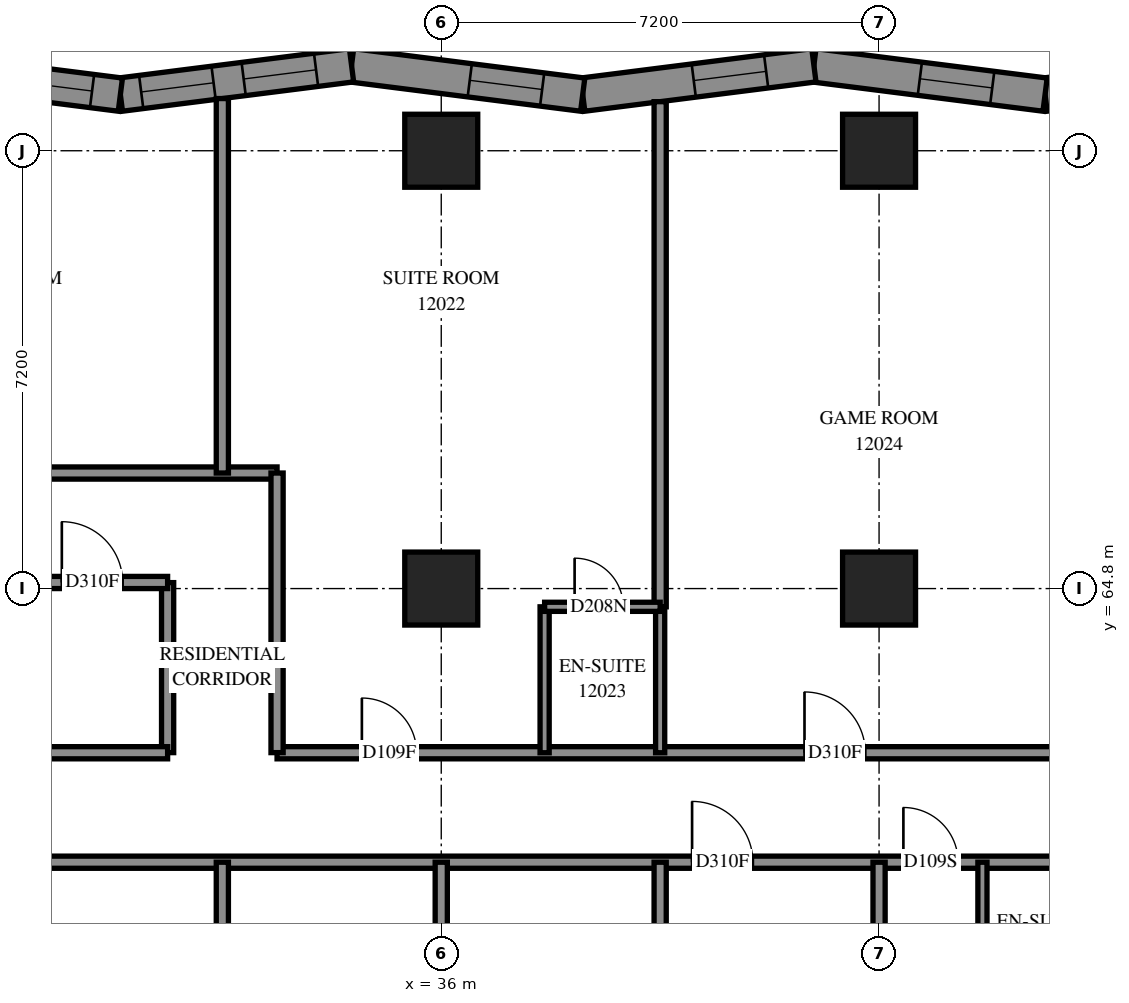
"""IFC4 building model, lengths in metres.
Left out: names, types, materials, properties, quantities, classifications, styles, units other than length and angle.
Written with IfcOpenShell. Run it as: python <this file> out.ifc"""

import sys

from ifc_helpers import new_model, si_unit, direction, frame, frame_2d, origin, origin_2d, place, context, subcontext, project, spatial, polyline, rectangle, outline, extrude, element, fill, save


model = new_model("IFC4")
c1 = context("Model", 3, precision=1e-05, world=origin(), true_north=direction((0.0, 1.0)))
c2 = subcontext(c1, "Body", "Model", "MODEL_VIEW")
j1 = project(units=[si_unit("LENGTHUNIT", "METRE"), si_unit("PLANEANGLEUNIT", "RADIAN")], contexts=[c1])
p1 = place(None, origin())
s1 = spatial("IfcSite", under=j1, at=p1, CompositionType="ELEMENT")
p2 = place(p1, origin())
s2 = spatial("IfcBuilding", under=s1, at=p2, CompositionType="ELEMENT")
p3 = place(p2, frame((0.0, 0.0, 47.4)))
s3 = spatial("IfcBuildingStorey", under=s2, at=p3, CompositionType="ELEMENT", Elevation=47.4)
for number, where, z_axis, x_axis in (
    (1, (36.0, 64.8, 0.0), (0.0, 0.0, 1.0), (1.0, 0.0, 0.0)),
    (2, (36.0, 72.0, 0.0), (0.0, 0.0, 1.0), (1.0, 0.0, 0.0)),
    (3, (43.2, 64.8, 0.0), (0.0, 0.0, 1.0), (1.0, 0.0, 0.0)),
    (4, (43.2, 72.0, 0.0), (0.0, 0.0, 1.0), (1.0, 0.0, 0.0)),
):
    element("IfcColumn", number, at=place(p3, frame(where, z_axis=z_axis, x_axis=x_axis)), inside=s3, PredefinedType="COLUMN", context=c2, shape_type="SweptSolid", body=[
        extrude(rectangle(XDim=1.2, YDim=1.2, at=origin_2d()), origin(), (0.0, 0.0, 1.0), 3.1),
    ])
p4 = place(p3, frame((49.732, 73.405, 0.0), z_axis=(0.0, 0.0, 1.0), x_axis=(-0.9920583495, -0.1257785003, 0.0)))
e5 = element("IfcWall", 5, at=p4, inside=s3, PredefinedType="SOLIDWALL", context=c2, shape_type="SweptSolid", body=[
    extrude(outline(polyline([(-0.035, -0.275), (3.797, -0.275), (3.867, 0.275), (0.035, 0.275), (-0.035, -0.275)])), origin(), (0.0, 0.0, 1.0), 3.1),
])
p5 = place(p4, frame((0.995, 0.0, 0.5)))
e6 = element("IfcOpeningElement", 6, at=p5, cuts=e5, PredefinedType="OPENING", context=c2, shape_type="SweptSolid", body=[
    extrude(rectangle(XDim=1.2, YDim=2.45, at=frame_2d((0.6, 1.225))), frame((0.0, 0.285, 0.0), z_axis=(0.0, -1.0, 0.0), x_axis=(1.0, 0.0, 0.0)), (0.0, 0.0, 1.0), 0.57),
])
p6 = place(p3, frame((45.93, 72.923, 0.0), z_axis=(0.0, 0.0, 1.0), x_axis=(-0.9920583495, 0.1257785003, 0.0)))
e7 = element("IfcWall", 7, at=p6, inside=s3, PredefinedType="SOLIDWALL", context=c2, shape_type="SweptSolid", body=[
    extrude(outline(polyline([(0.035, -0.275), (3.867, -0.275), (3.797, 0.275), (-0.035, 0.275), (0.035, -0.275)])), origin(), (0.0, 0.0, 1.0), 3.1),
])
p7 = place(p6, frame((0.876, 0.0, 0.5)))
e8 = element("IfcOpeningElement", 8, at=p7, cuts=e7, PredefinedType="OPENING", context=c2, shape_type="SweptSolid", body=[
    extrude(rectangle(XDim=1.2, YDim=2.45, at=frame_2d((0.6, 1.225))), frame((0.0, 0.285, 0.0), z_axis=(0.0, -1.0, 0.0), x_axis=(1.0, 0.0, 0.0)), (0.0, 0.0, 1.0), 0.57),
])
p8 = place(p3, frame((42.128, 73.405, 0.0), z_axis=(0.0, 0.0, 1.0), x_axis=(-0.9920583495, -0.1257785003, 0.0)))
e9 = element("IfcWall", 9, at=p8, inside=s3, PredefinedType="SOLIDWALL", context=c2, shape_type="SweptSolid", body=[
    extrude(outline(polyline([(-0.035, -0.275), (3.797, -0.275), (3.867, 0.275), (0.035, 0.275), (-0.035, -0.275)])), origin(), (0.0, 0.0, 1.0), 3.1),
])
p9 = place(p8, frame((0.792, 0.0, 0.5)))
e10 = element("IfcOpeningElement", 10, at=p9, cuts=e9, PredefinedType="OPENING", context=c2, shape_type="SweptSolid", body=[
    extrude(rectangle(XDim=1.2, YDim=2.45, at=frame_2d((0.6, 1.225))), frame((0.0, 0.285, 0.0), z_axis=(0.0, -1.0, 0.0), x_axis=(1.0, 0.0, 0.0)), (0.0, 0.0, 1.0), 0.57),
])
p10 = place(p3, frame((38.327, 72.923, 0.0), z_axis=(0.0, 0.0, 1.0), x_axis=(-0.9920583495, 0.1257785003, 0.0)))
e11 = element("IfcWall", 11, at=p10, inside=s3, PredefinedType="SOLIDWALL", context=c2, shape_type="SweptSolid", body=[
    extrude(outline(polyline([(0.035, -0.275), (3.867, -0.275), (3.797, 0.275), (-0.035, 0.275), (0.035, -0.275)])), origin(), (0.0, 0.0, 1.0), 3.1),
])
p11 = place(p10, frame((0.673, 0.0, 0.5)))
e12 = element("IfcOpeningElement", 12, at=p11, cuts=e11, PredefinedType="OPENING", context=c2, shape_type="SweptSolid", body=[
    extrude(rectangle(XDim=1.2, YDim=2.45, at=frame_2d((0.6, 1.225))), frame((0.0, 0.285, 0.0), z_axis=(0.0, -1.0, 0.0), x_axis=(1.0, 0.0, 0.0)), (0.0, 0.0, 1.0), 0.57),
])
p12 = place(p3, frame((34.525, 73.405, 0.0), z_axis=(0.0, 0.0, 1.0), x_axis=(-0.9920583495, -0.1257785003, 0.0)))
e13 = element("IfcWall", 13, at=p12, inside=s3, PredefinedType="SOLIDWALL", context=c2, shape_type="SweptSolid", body=[
    extrude(outline(polyline([(-0.035, -0.275), (3.797, -0.275), (3.867, 0.275), (0.035, 0.275), (-0.035, -0.275)])), origin(), (0.0, 0.0, 1.0), 3.1),
])
p13 = place(p12, frame((0.588, 0.0, 0.5)))
e14 = element("IfcOpeningElement", 14, at=p13, cuts=e13, PredefinedType="OPENING", context=c2, shape_type="SweptSolid", body=[
    extrude(rectangle(XDim=1.2, YDim=2.45, at=frame_2d((0.6, 1.225))), frame((0.0, 0.285, 0.0), z_axis=(0.0, -1.0, 0.0), x_axis=(1.0, 0.0, 0.0)), (0.0, 0.0, 1.0), 0.57),
])
p14 = place(p12, frame((2.287, 0.0, 0.5)))
e15 = element("IfcOpeningElement", 15, at=p14, cuts=e13, PredefinedType="OPENING", context=c2, shape_type="SweptSolid", body=[
    extrude(rectangle(XDim=1.2, YDim=2.45, at=frame_2d((0.6, 1.225))), frame((0.0, 0.285, 0.0), z_axis=(0.0, -1.0, 0.0), x_axis=(1.0, 0.0, 0.0)), (0.0, 0.0, 1.0), 0.57),
])
p15 = place(p3, frame((30.723, 72.923, 0.0), z_axis=(0.0, 0.0, 1.0), x_axis=(-0.9920583495, 0.1257785003, 0.0)))
e16 = element("IfcWall", 16, at=p15, inside=s3, PredefinedType="SOLIDWALL", context=c2, shape_type="SweptSolid", body=[
    extrude(outline(polyline([(0.035, -0.275), (3.867, -0.275), (3.797, 0.275), (-0.035, 0.275), (0.035, -0.275)])), origin(), (0.0, 0.0, 1.0), 3.1),
])
p16 = place(p15, frame((0.469, 0.0, 0.5)))
e17 = element("IfcOpeningElement", 17, at=p16, cuts=e16, PredefinedType="OPENING", context=c2, shape_type="SweptSolid", body=[
    extrude(rectangle(XDim=1.2, YDim=2.45, at=frame_2d((0.6, 1.225))), frame((0.0, 0.285, 0.0), z_axis=(0.0, -1.0, 0.0), x_axis=(1.0, 0.0, 0.0)), (0.0, 0.0, 1.0), 0.57),
])
p17 = place(p15, frame((2.168, 0.0, 0.5)))
e18 = element("IfcOpeningElement", 18, at=p17, cuts=e16, PredefinedType="OPENING", context=c2, shape_type="SweptSolid", body=[
    extrude(rectangle(XDim=1.2, YDim=2.45, at=frame_2d((0.6, 1.225))), frame((0.0, 0.285, 0.0), z_axis=(0.0, -1.0, 0.0), x_axis=(1.0, 0.0, 0.0)), (0.0, 0.0, 1.0), 0.57),
])
p18 = place(p3, frame((28.802, 60.3, 0.0), z_axis=(0.0, 0.0, 1.0), x_axis=(1.0, 0.0, 0.0)))
e19 = element("IfcWall", 19, at=p18, inside=s3, PredefinedType="PARTITIONING", context=c2, shape_type="SweptSolid", body=[
    extrude(rectangle(XDim=24.108, YDim=0.2, at=frame_2d((12.054, 0.0))), origin(), (0.0, 0.0, 1.0), 3.1),
])
p19 = place(p18, frame((11.323, 0.0, 0.0)))
e20 = element("IfcOpeningElement", 20, at=p19, cuts=e19, PredefinedType="OPENING", context=c2, shape_type="SweptSolid", body=[
    extrude(rectangle(XDim=1.0, YDim=2.1, at=frame_2d((0.5, 1.05))), frame((0.0, 0.11, 0.0), z_axis=(0.0, -1.0, 0.0), x_axis=(1.0, 0.0, 0.0)), (0.0, 0.0, 1.0), 0.22),
])
p20 = place(p18, frame((14.798, 0.0, 0.0)))
e21 = element("IfcOpeningElement", 21, at=p20, cuts=e19, PredefinedType="OPENING", context=c2, shape_type="SweptSolid", body=[
    extrude(rectangle(XDim=0.9, YDim=2.1, at=frame_2d((0.45, 1.05))), frame((0.0, 0.11, 0.0), z_axis=(0.0, -1.0, 0.0), x_axis=(1.0, 0.0, 0.0)), (0.0, 0.0, 1.0), 0.22),
])
p21 = place(p18, frame((18.833, 0.0, 0.0)))
e22 = element("IfcOpeningElement", 22, at=p21, cuts=e19, PredefinedType="OPENING", context=c2, shape_type="SweptSolid", body=[
    extrude(rectangle(XDim=1.0, YDim=2.1, at=frame_2d((0.5, 1.05))), frame((0.0, 0.11, 0.0), z_axis=(0.0, -1.0, 0.0), x_axis=(1.0, 0.0, 0.0)), (0.0, 0.0, 1.0), 0.22),
])
p22 = place(p18, frame((22.839, 0.0, 0.0)))
e23 = element("IfcOpeningElement", 23, at=p22, cuts=e19, PredefinedType="OPENING", context=c2, shape_type="SweptSolid", body=[
    extrude(rectangle(XDim=1.0, YDim=2.1, at=frame_2d((0.5, 1.05))), frame((0.0, 0.11, 0.0), z_axis=(0.0, -1.0, 0.0), x_axis=(1.0, 0.0, 0.0)), (0.0, 0.0, 1.0), 0.22),
])
p23 = place(p3, frame((33.3, 62.1, 0.0), z_axis=(0.0, 0.0, 1.0), x_axis=(1.0, 0.0, 0.0)))
e24 = element("IfcWall", 24, at=p23, inside=s3, PredefinedType="PARTITIONING", context=c2, shape_type="SweptSolid", body=[
    extrude(rectangle(XDim=21.2, YDim=0.2, at=frame_2d((10.6, 0.0))), origin(), (0.0, 0.0, 1.0), 3.1),
])
p24 = place(p23, frame((1.395, 0.0, 0.0)))
e25 = element("IfcOpeningElement", 25, at=p24, cuts=e24, PredefinedType="OPENING", context=c2, shape_type="SweptSolid", body=[
    extrude(rectangle(XDim=0.9, YDim=2.1, at=frame_2d((0.45, 1.05))), frame((0.0, 0.11, 0.0), z_axis=(0.0, -1.0, 0.0), x_axis=(1.0, 0.0, 0.0)), (0.0, 0.0, 1.0), 0.22),
])
p25 = place(p23, frame((8.674, 0.0, 0.0)))
e26 = element("IfcOpeningElement", 26, at=p25, cuts=e24, PredefinedType="OPENING", context=c2, shape_type="SweptSolid", body=[
    extrude(rectangle(XDim=1.0, YDim=2.1, at=frame_2d((0.5, 1.05))), frame((0.0, 0.11, 0.0), z_axis=(0.0, -1.0, 0.0), x_axis=(1.0, 0.0, 0.0)), (0.0, 0.0, 1.0), 0.22),
])
p26 = place(p23, frame((15.874, 0.0, 0.0)))
e27 = element("IfcOpeningElement", 27, at=p26, cuts=e24, PredefinedType="OPENING", context=c2, shape_type="SweptSolid", body=[
    extrude(rectangle(XDim=1.0, YDim=2.1, at=frame_2d((0.5, 1.05))), frame((0.0, 0.11, 0.0), z_axis=(0.0, -1.0, 0.0), x_axis=(1.0, 0.0, 0.0)), (0.0, 0.0, 1.0), 0.22),
])
p27 = place(p3, frame((21.602, 66.7, 0.0), z_axis=(0.0, 0.0, 1.0), x_axis=(1.0, 0.0, 0.0)))
e28 = element("IfcWall", 28, at=p27, inside=s3, PredefinedType="PARTITIONING", context=c2, shape_type="SweptSolid", body=[
    extrude(rectangle(XDim=11.698, YDim=0.2, at=frame_2d((5.849, 0.0))), origin(), (0.0, 0.0, 1.0), 3.1),
])
p28 = place(p27, frame((1.79, 0.0, 0.0)))
e29 = element("IfcOpeningElement", 29, at=p28, cuts=e28, PredefinedType="OPENING", context=c2, shape_type="SweptSolid", body=[
    extrude(rectangle(XDim=1.0, YDim=2.1, at=frame_2d((0.5, 1.05))), frame((0.0, 0.11, 0.0), z_axis=(0.0, -1.0, 0.0), x_axis=(1.0, 0.0, 0.0)), (0.0, 0.0, 1.0), 0.22),
])
p29 = place(p27, frame((5.972, 0.0, 0.0)))
e30 = element("IfcOpeningElement", 30, at=p29, cuts=e28, PredefinedType="OPENING", context=c2, shape_type="SweptSolid", body=[
    extrude(rectangle(XDim=1.0, YDim=2.1, at=frame_2d((0.5, 1.05))), frame((0.0, 0.11, 0.0), z_axis=(0.0, -1.0, 0.0), x_axis=(1.0, 0.0, 0.0)), (0.0, 0.0, 1.0), 0.22),
])
p30 = place(p3, frame((39.6, 64.5, 0.0), z_axis=(0.0, 0.0, 1.0), x_axis=(0.0, 1.0, 0.0)))
e31 = element("IfcWall", 31, at=p30, inside=s3, PredefinedType="PARTITIONING", context=c2, shape_type="SweptSolid", body=[
    extrude(rectangle(XDim=8.307, YDim=0.2, at=frame_2d((4.154, 0.0))), origin(), (0.0, 0.0, 1.0), 3.1),
])
p31 = place(p3, frame((32.4, 66.7, 0.0), z_axis=(0.0, 0.0, 1.0), x_axis=(0.0, 1.0, 0.0)))
e32 = element("IfcWall", 32, at=p31, inside=s3, PredefinedType="PARTITIONING", context=c2, shape_type="SweptSolid", body=[
    extrude(rectangle(XDim=6.158, YDim=0.2, at=frame_2d((3.079, 0.0))), origin(), (0.0, 0.0, 1.0), 3.1),
])
p32 = place(p3, frame((33.3, 62.102, 0.0), z_axis=(0.0, 0.0, 1.0), x_axis=(0.0, 1.0, 0.0)))
e33 = element("IfcWall", 33, at=p32, inside=s3, PredefinedType="PARTITIONING", context=c2, shape_type="SweptSolid", body=[
    extrude(rectangle(XDim=4.598, YDim=0.2, at=frame_2d((2.299, 0.0))), origin(), (0.0, 0.0, 1.0), 3.1),
])
for number, where, z_axis, x_axis in (
    (34, (32.4, 55.868, 0.0), (0.0, 0.0, 1.0), (0.0, 1.0, 0.0)),
    (35, (39.6, 55.868, 0.0), (0.0, 0.0, 1.0), (0.0, 1.0, 0.0)),
):
    element("IfcWall", number, at=place(p3, frame(where, z_axis=z_axis, x_axis=x_axis)), inside=s3, PredefinedType="PARTITIONING", context=c2, shape_type="SweptSolid", body=[
        extrude(rectangle(XDim=4.432, YDim=0.2, at=frame_2d((2.216, 0.0))), origin(), (0.0, 0.0, 1.0), 3.1),
    ])
p33 = place(p3, frame((31.5, 62.102, 0.0), z_axis=(0.0, 0.0, 1.0), x_axis=(0.0, 1.0, 0.0)))
e36 = element("IfcWall", 36, at=p33, inside=s3, PredefinedType="PARTITIONING", context=c2, shape_type="SweptSolid", body=[
    extrude(rectangle(XDim=2.796, YDim=0.2, at=frame_2d((1.398, 0.0))), origin(), (0.0, 0.0, 1.0), 3.1),
])
p34 = place(p3, frame((28.802, 62.1, 0.0), z_axis=(0.0, 0.0, 1.0), x_axis=(1.0, 0.0, 0.0)))
e37 = element("IfcWall", 37, at=p34, inside=s3, PredefinedType="PARTITIONING", context=c2, shape_type="SweptSolid", body=[
    extrude(rectangle(XDim=2.698, YDim=0.2, at=frame_2d((1.349, 0.0))), origin(), (0.0, 0.0, 1.0), 3.1),
])
for number, where, z_axis, x_axis in (
    (38, (37.7, 62.1, 0.0), (0.0, 0.0, 1.0), (0.0, 1.0, 0.0)),
    (39, (39.6, 62.1, 0.0), (0.0, 0.0, 1.0), (0.0, 1.0, 0.0)),
    (40, (44.9, 57.9, 0.0), (0.0, 0.0, 1.0), (0.0, 1.0, 0.0)),
):
    element("IfcWall", number, at=place(p3, frame(where, z_axis=z_axis, x_axis=x_axis)), inside=s3, PredefinedType="PARTITIONING", context=c2, shape_type="SweptSolid", body=[
        extrude(rectangle(XDim=2.4, YDim=0.15, at=frame_2d((1.2, 0.0))), origin(), (0.0, 0.0, 1.0), 3.1),
    ])
p35 = place(p3, frame((29.4, 64.9, 0.0), z_axis=(0.0, 0.0, 1.0), x_axis=(1.0, 0.0, 0.0)))
e41 = element("IfcWall", 41, at=p35, inside=s3, PredefinedType="PARTITIONING", context=c2, shape_type="SweptSolid", body=[
    extrude(rectangle(XDim=2.1, YDim=0.2, at=frame_2d((1.05, 0.0))), origin(), (0.0, 0.0, 1.0), 3.1),
])
p36 = place(p35, frame((0.36, 0.0, 0.0)))
e42 = element("IfcOpeningElement", 42, at=p36, cuts=e41, PredefinedType="OPENING", context=c2, shape_type="SweptSolid", body=[
    extrude(rectangle(XDim=1.0, YDim=2.1, at=frame_2d((0.5, 1.05))), frame((0.0, 0.11, 0.0), z_axis=(0.0, -1.0, 0.0), x_axis=(1.0, 0.0, 0.0)), (0.0, 0.0, 1.0), 0.22),
])
for number, where, z_axis, x_axis in (
    (43, (36.0, 58.2, 0.0), (0.0, 0.0, 1.0), (0.0, 1.0, 0.0)),
    (44, (43.2, 58.2, 0.0), (0.0, 0.0, 1.0), (0.0, 1.0, 0.0)),
):
    element("IfcWall", number, at=place(p3, frame(where, z_axis=z_axis, x_axis=x_axis)), inside=s3, PredefinedType="PARTITIONING", context=c2, shape_type="SweptSolid", body=[
        extrude(rectangle(XDim=2.1, YDim=0.2, at=frame_2d((1.05, 0.0))), origin(), (0.0, 0.0, 1.0), 3.1),
    ])
p37 = place(p3, frame((37.7, 64.5, 0.0), z_axis=(0.0, 0.0, 1.0), x_axis=(1.0, 0.0, 0.0)))
e45 = element("IfcWall", 45, at=p37, inside=s3, PredefinedType="PARTITIONING", context=c2, shape_type="SweptSolid", body=[
    extrude(rectangle(XDim=1.9, YDim=0.15, at=frame_2d((0.95, 0.0))), origin(), (0.0, 0.0, 1.0), 3.1),
])
p38 = place(p37, frame((0.493, 0.0, 0.0)))
e46 = element("IfcOpeningElement", 46, at=p38, cuts=e45, PredefinedType="OPENING", context=c2, shape_type="SweptSolid", body=[
    extrude(rectangle(XDim=0.8, YDim=2.1, at=frame_2d((0.4, 1.05))), frame((0.0, 0.085, 0.0), z_axis=(0.0, -1.0, 0.0), x_axis=(1.0, 0.0, 0.0)), (0.0, 0.0, 1.0), 0.17),
])
p39 = place(p7, origin())
e47 = element("IfcWindow", 47, at=p39, inside=s3, PartitioningType="SINGLE_PANEL", PredefinedType="WINDOW", context=c2, shape_type="SweptSolid", body=[
    extrude(rectangle(XDim=1.2, YDim=2.45, at=frame_2d((0.6, 1.225))), frame((0.0, 0.155, 0.0), z_axis=(0.0, -1.0, 0.0), x_axis=(1.0, 0.0, 0.0)), (0.0, 0.0, 1.0), 0.06),
])
fill(e8, e47)
p40 = place(p9, origin())
e48 = element("IfcWindow", 48, at=p40, inside=s3, PartitioningType="SINGLE_PANEL", PredefinedType="WINDOW", context=c2, shape_type="SweptSolid", body=[
    extrude(rectangle(XDim=1.2, YDim=2.45, at=frame_2d((0.6, 1.225))), frame((0.0, 0.155, 0.0), z_axis=(0.0, -1.0, 0.0), x_axis=(1.0, 0.0, 0.0)), (0.0, 0.0, 1.0), 0.06),
])
fill(e10, e48)
p41 = place(p11, origin())
e49 = element("IfcWindow", 49, at=p41, inside=s3, PartitioningType="SINGLE_PANEL", PredefinedType="WINDOW", context=c2, shape_type="SweptSolid", body=[
    extrude(rectangle(XDim=1.2, YDim=2.45, at=frame_2d((0.6, 1.225))), frame((0.0, 0.155, 0.0), z_axis=(0.0, -1.0, 0.0), x_axis=(1.0, 0.0, 0.0)), (0.0, 0.0, 1.0), 0.06),
])
fill(e12, e49)
p42 = place(p13, origin())
e50 = element("IfcWindow", 50, at=p42, inside=s3, PartitioningType="SINGLE_PANEL", PredefinedType="WINDOW", context=c2, shape_type="SweptSolid", body=[
    extrude(rectangle(XDim=1.2, YDim=2.45, at=frame_2d((0.6, 1.225))), frame((0.0, 0.155, 0.0), z_axis=(0.0, -1.0, 0.0), x_axis=(1.0, 0.0, 0.0)), (0.0, 0.0, 1.0), 0.06),
])
fill(e14, e50)
p43 = place(p14, origin())
e51 = element("IfcWindow", 51, at=p43, inside=s3, PartitioningType="SINGLE_PANEL", PredefinedType="WINDOW", context=c2, shape_type="SweptSolid", body=[
    extrude(rectangle(XDim=1.2, YDim=2.45, at=frame_2d((0.6, 1.225))), frame((0.0, 0.155, 0.0), z_axis=(0.0, -1.0, 0.0), x_axis=(1.0, 0.0, 0.0)), (0.0, 0.0, 1.0), 0.06),
])
fill(e15, e51)
p44 = place(p16, origin())
e52 = element("IfcWindow", 52, at=p44, inside=s3, PartitioningType="SINGLE_PANEL", PredefinedType="WINDOW", context=c2, shape_type="SweptSolid", body=[
    extrude(rectangle(XDim=1.2, YDim=2.45, at=frame_2d((0.6, 1.225))), frame((0.0, 0.155, 0.0), z_axis=(0.0, -1.0, 0.0), x_axis=(1.0, 0.0, 0.0)), (0.0, 0.0, 1.0), 0.06),
])
fill(e17, e52)
p45 = place(p36, origin())
e53 = element("IfcDoor", 53, at=p45, inside=s3, OperationType="SINGLE_SWING_RIGHT", PredefinedType="DOOR", context=c2, shape_type="SweptSolid", body=[
    extrude(rectangle(XDim=1.0, YDim=2.1, at=frame_2d((0.5, 1.05))), frame((0.0, 0.025, 0.0), z_axis=(0.0, -1.0, 0.0), x_axis=(1.0, 0.0, 0.0)), (0.0, 0.0, 1.0), 0.05),
])
fill(e42, e53)
p46 = place(p24, origin())
e54 = element("IfcDoor", 54, at=p46, inside=s3, OperationType="SINGLE_SWING_LEFT", PredefinedType="DOOR", context=c2, shape_type="SweptSolid", body=[
    extrude(rectangle(XDim=0.9, YDim=2.1, at=frame_2d((0.45, 1.05))), frame((0.0, 0.025, 0.0), z_axis=(0.0, -1.0, 0.0), x_axis=(1.0, 0.0, 0.0)), (0.0, 0.0, 1.0), 0.05),
])
fill(e25, e54)
p47 = place(p38, origin())
e55 = element("IfcDoor", 55, at=p47, inside=s3, OperationType="SINGLE_SWING_RIGHT", PredefinedType="DOOR", context=c2, shape_type="SweptSolid", body=[
    extrude(rectangle(XDim=0.8, YDim=2.1, at=frame_2d((0.4, 1.05))), frame((0.0, 0.025, 0.0), z_axis=(0.0, -1.0, 0.0), x_axis=(1.0, 0.0, 0.0)), (0.0, 0.0, 1.0), 0.05),
])
fill(e46, e55)
p48 = place(p25, origin())
e56 = element("IfcDoor", 56, at=p48, inside=s3, OperationType="SINGLE_SWING_LEFT", PredefinedType="DOOR", context=c2, shape_type="SweptSolid", body=[
    extrude(rectangle(XDim=1.0, YDim=2.1, at=frame_2d((0.5, 1.05))), frame((0.0, 0.025, 0.0), z_axis=(0.0, -1.0, 0.0), x_axis=(1.0, 0.0, 0.0)), (0.0, 0.0, 1.0), 0.05),
])
fill(e26, e56)
p49 = place(p19, origin())
e57 = element("IfcDoor", 57, at=p49, inside=s3, OperationType="SINGLE_SWING_RIGHT", PredefinedType="DOOR", context=c2, shape_type="SweptSolid", body=[
    extrude(rectangle(XDim=1.0, YDim=2.1, at=frame_2d((0.5, 1.05))), frame((0.0, 0.025, 0.0), z_axis=(0.0, -1.0, 0.0), x_axis=(1.0, 0.0, 0.0)), (0.0, 0.0, 1.0), 0.05),
])
fill(e20, e57)
p50 = place(p20, origin())
e58 = element("IfcDoor", 58, at=p50, inside=s3, OperationType="SINGLE_SWING_LEFT", PredefinedType="DOOR", context=c2, shape_type="SweptSolid", body=[
    extrude(rectangle(XDim=0.9, YDim=2.1, at=frame_2d((0.45, 1.05))), frame((0.0, 0.025, 0.0), z_axis=(0.0, -1.0, 0.0), x_axis=(1.0, 0.0, 0.0)), (0.0, 0.0, 1.0), 0.05),
])
fill(e21, e58)
save(model, sys.argv[1])
